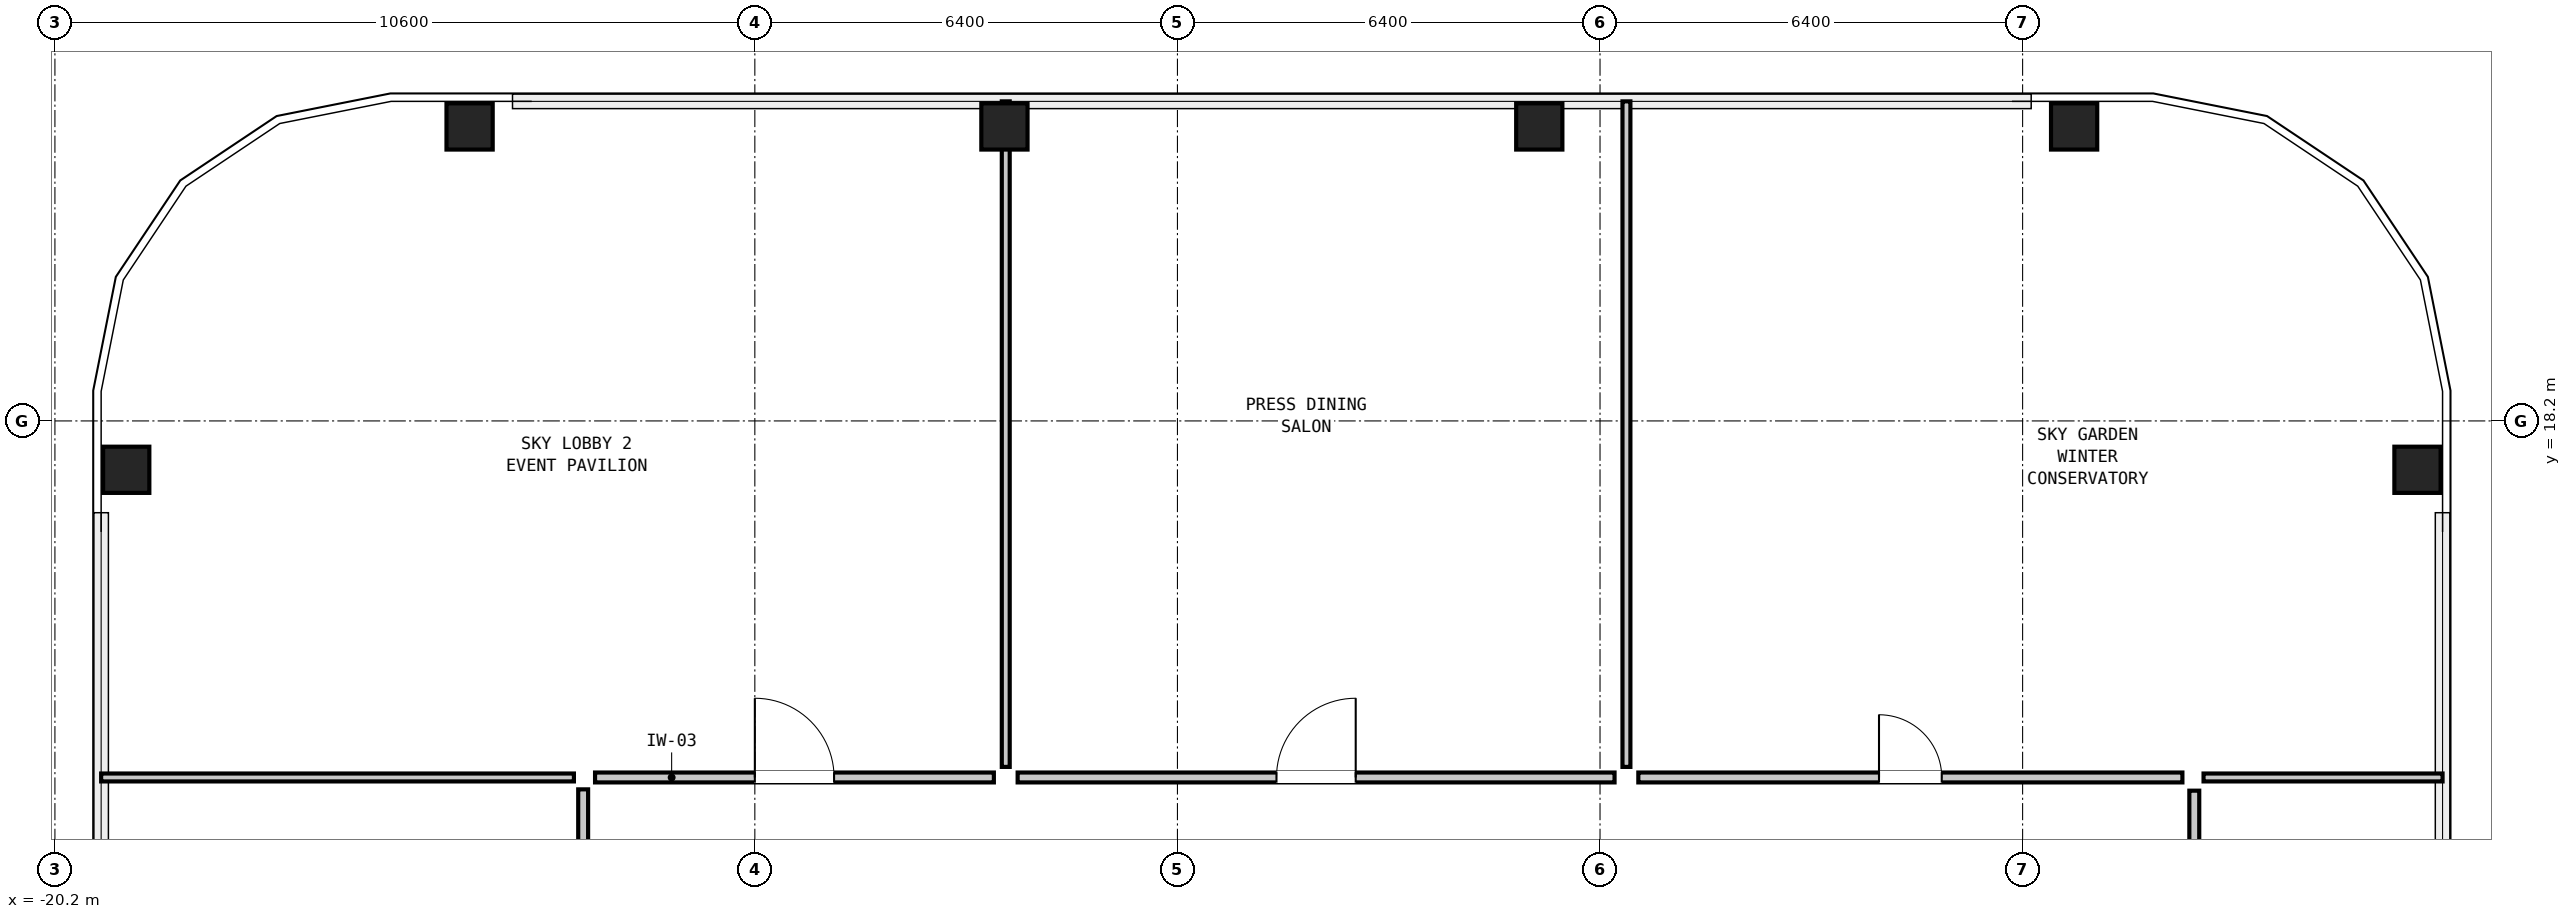
"""IFC4 building model, lengths in metres.
Left out: names, types, materials, properties, quantities, classifications, styles, units other than length and angle.
Written with IfcOpenShell. Run it as: python <this file> out.ifc"""

import sys

from ifc_helpers import new_model, si_unit, direction, frame, frame_2d, origin, origin_2d, place, context, subcontext, project, spatial, rectangle, hollow_rectangle, extrude, element, fill, save


model = new_model("IFC4")
c1 = context("Model", 3, precision=1e-05, world=origin(), true_north=direction((0.0, 1.0)))
c2 = subcontext(c1, "Body", "Model", "MODEL_VIEW")
j1 = project(units=[si_unit("LENGTHUNIT", "METRE"), si_unit("PLANEANGLEUNIT", "RADIAN")], contexts=[c1])
p1 = place(None, origin())
s1 = spatial("IfcSite", under=j1, at=p1, CompositionType="ELEMENT")
p2 = place(p1, origin())
s2 = spatial("IfcBuilding", under=s1, at=p2, CompositionType="ELEMENT")
p3 = place(p2, frame((0.0, 0.0, 148.2)))
s3 = spatial("IfcBuildingStorey", under=s2, at=p3, CompositionType="ELEMENT", Elevation=148.2)
for number, where, z_axis, x_axis in (
    (1, (15.58, 17.46, 0.0), (0.0, 0.0, 1.0), (0.0, 1.0, 0.0)),
    (2, (10.38, 22.66, 0.0), (0.0, 0.0, 1.0), (1.0, 0.0, 0.0)),
    (3, (2.28, 22.66, 0.0), (0.0, 0.0, 1.0), (1.0, 0.0, 0.0)),
    (4, (-5.82, 22.66, 0.0), (0.0, 0.0, 1.0), (1.0, 0.0, 0.0)),
    (5, (-13.92, 22.66, 0.0), (0.0, 0.0, 1.0), (1.0, 0.0, 0.0)),
    (6, (-19.12, 17.46, 0.0), (0.0, 0.0, 1.0), (0.0, 1.0, 0.0)),
):
    element("IfcColumn", number, at=place(p3, frame(where, z_axis=z_axis, x_axis=x_axis)), inside=s3, PredefinedType="COLUMN", context=c2, shape_type="SweptSolid", body=[
        extrude(hollow_rectangle(XDim=0.7, YDim=0.7, WallThickness=0.045, at=origin_2d()), origin(), (0.0, 0.0, 1.0), 3.6),
    ])
p4 = place(p3, frame((-19.5, 12.8, 0.0), z_axis=(0.0, 0.0, 1.0), x_axis=(1.0, 0.0, 0.0)))
e7 = element("IfcWall", 7, at=p4, inside=s3, PredefinedType="PARTITIONING", context=c2, shape_type="SweptSolid", body=[
    extrude(rectangle(XDim=7.16, YDim=0.12, at=frame_2d((3.58, 0.0))), origin(), (0.0, 0.0, 1.0), 3.22),
])
p5 = place(p3, frame((12.34, 12.8, 0.0), z_axis=(0.0, 0.0, 1.0), x_axis=(1.0, 0.0, 0.0)))
e8 = element("IfcWall", 8, at=p5, inside=s3, PredefinedType="PARTITIONING", context=c2, shape_type="SweptSolid", body=[
    extrude(rectangle(XDim=3.62, YDim=0.12, at=frame_2d((1.81, 0.0))), origin(), (0.0, 0.0, 1.0), 3.22),
])
for number, where, z_axis, x_axis in (
    (9, (-5.8, 12.96, 0.0), (0.0, 0.0, 1.0), (0.0, 1.0, 0.0)),
    (10, (3.6, 12.96, 0.0), (0.0, 0.0, 1.0), (0.0, 1.0, 0.0)),
):
    element("IfcWall", number, at=place(p3, frame(where, z_axis=z_axis, x_axis=x_axis)), inside=s3, PredefinedType="PARTITIONING", context=c2, shape_type="SweptSolid", body=[
        extrude(rectangle(XDim=10.08, YDim=0.12, at=frame_2d((5.04, 0.0))), origin(), (0.0, 0.0, 1.0), 2.438),
    ])
p6 = place(p3, frame((-12.02, 12.8, 0.0), z_axis=(0.0, 0.0, 1.0), x_axis=(1.0, 0.0, 0.0)))
e11 = element("IfcWall", 11, at=p6, inside=s3, PredefinedType="PARTITIONING", context=c2, shape_type="SweptSolid", body=[
    extrude(rectangle(XDim=6.04, YDim=0.15, at=frame_2d((3.02, 0.0))), origin(), (0.0, 0.0, 1.0), 3.22),
])
p7 = place(p6, frame((2.42, 0.0, 0.0)))
e12 = element("IfcOpeningElement", 12, at=p7, cuts=e11, PredefinedType="OPENING", context=c2, shape_type="SweptSolid", body=[
    extrude(rectangle(XDim=1.2, YDim=2.1, at=frame_2d((0.6, 1.05))), frame((0.0, 0.087, 0.0), z_axis=(0.0, -1.0, 0.0), x_axis=(1.0, 0.0, 0.0)), (0.0, 0.0, 1.0), 0.174),
])
p8 = place(p3, frame((-5.62, 12.8, 0.0), z_axis=(0.0, 0.0, 1.0), x_axis=(1.0, 0.0, 0.0)))
e13 = element("IfcWall", 13, at=p8, inside=s3, PredefinedType="PARTITIONING", context=c2, shape_type="SweptSolid", body=[
    extrude(rectangle(XDim=9.04, YDim=0.15, at=frame_2d((4.52, 0.0))), origin(), (0.0, 0.0, 1.0), 3.22),
])
p9 = place(p8, frame((3.92, 0.0, 0.0)))
e14 = element("IfcOpeningElement", 14, at=p9, cuts=e13, PredefinedType="OPENING", context=c2, shape_type="SweptSolid", body=[
    extrude(rectangle(XDim=1.2, YDim=2.1, at=frame_2d((0.6, 1.05))), frame((0.0, 0.087, 0.0), z_axis=(0.0, -1.0, 0.0), x_axis=(1.0, 0.0, 0.0)), (0.0, 0.0, 1.0), 0.174),
])
p10 = place(p3, frame((3.78, 12.8, 0.0), z_axis=(0.0, 0.0, 1.0), x_axis=(1.0, 0.0, 0.0)))
e15 = element("IfcWall", 15, at=p10, inside=s3, PredefinedType="PARTITIONING", context=c2, shape_type="SweptSolid", body=[
    extrude(rectangle(XDim=8.24, YDim=0.15, at=frame_2d((4.12, 0.0))), origin(), (0.0, 0.0, 1.0), 3.22),
])
p11 = place(p10, frame((3.645, 0.0, 0.0)))
e16 = element("IfcOpeningElement", 16, at=p11, cuts=e15, PredefinedType="OPENING", context=c2, shape_type="SweptSolid", body=[
    extrude(rectangle(XDim=0.95, YDim=2.1, at=frame_2d((0.475, 1.05))), frame((0.0, 0.087, 0.0), z_axis=(0.0, -1.0, 0.0), x_axis=(1.0, 0.0, 0.0)), (0.0, 0.0, 1.0), 0.174),
])
p12 = place(p3, frame((-12.2, -11.42, 0.0), z_axis=(0.0, 0.0, 1.0), x_axis=(0.0, 1.0, 0.0)))
e17 = element("IfcWall", 17, at=p12, inside=s3, PredefinedType="PARTITIONING", context=c2, shape_type="SweptSolid", body=[
    extrude(rectangle(XDim=24.04, YDim=0.15, at=frame_2d((12.02, 0.0))), origin(), (0.0, 0.0, 1.0), 3.22),
])
p13 = place(p12, frame((11.545, 0.0, 0.0)))
e18 = element("IfcOpeningElement", 18, at=p13, cuts=e17, PredefinedType="OPENING", context=c2, shape_type="SweptSolid", body=[
    extrude(rectangle(XDim=0.95, YDim=2.1, at=frame_2d((0.475, 1.05))), frame((0.0, 0.087, 0.0), z_axis=(0.0, -1.0, 0.0), x_axis=(1.0, 0.0, 0.0)), (0.0, 0.0, 1.0), 0.174),
])
p14 = place(p3, frame((12.2, 3.8, 0.0), z_axis=(0.0, 0.0, 1.0), x_axis=(0.0, 1.0, 0.0)))
e19 = element("IfcWall", 19, at=p14, inside=s3, PredefinedType="PARTITIONING", context=c2, shape_type="SweptSolid", body=[
    extrude(rectangle(XDim=8.8, YDim=0.15, at=frame_2d((4.4, 0.0))), origin(), (0.0, 0.0, 1.0), 3.22),
])
p15 = place(p14, frame((3.8, 0.0, 0.0)))
e20 = element("IfcOpeningElement", 20, at=p15, cuts=e19, PredefinedType="OPENING", context=c2, shape_type="SweptSolid", body=[
    extrude(rectangle(XDim=1.2, YDim=2.1, at=frame_2d((0.6, 1.05))), frame((0.0, 0.087, 0.0), z_axis=(0.0, -1.0, 0.0), x_axis=(1.0, 0.0, 0.0)), (0.0, 0.0, 1.0), 0.174),
])
p16 = place(p7, origin())
e21 = element("IfcDoor", 21, at=p16, inside=s3, OperationType="SINGLE_SWING_LEFT", PredefinedType="DOOR", context=c2, shape_type="SweptSolid", body=[
    extrude(rectangle(XDim=1.2, YDim=2.1, at=frame_2d((0.6, 1.05))), frame((0.0, 0.025, 0.0), z_axis=(0.0, -1.0, 0.0), x_axis=(1.0, 0.0, 0.0)), (0.0, 0.0, 1.0), 0.05),
])
fill(e12, e21)
p17 = place(p9, origin())
e22 = element("IfcDoor", 22, at=p17, inside=s3, OperationType="SINGLE_SWING_RIGHT", PredefinedType="DOOR", context=c2, shape_type="SweptSolid", body=[
    extrude(rectangle(XDim=1.2, YDim=2.1, at=frame_2d((0.6, 1.05))), frame((0.0, 0.025, 0.0), z_axis=(0.0, -1.0, 0.0), x_axis=(1.0, 0.0, 0.0)), (0.0, 0.0, 1.0), 0.05),
])
fill(e14, e22)
p18 = place(p11, origin())
e23 = element("IfcDoor", 23, at=p18, inside=s3, OperationType="SINGLE_SWING_LEFT", PredefinedType="DOOR", context=c2, shape_type="SweptSolid", body=[
    extrude(rectangle(XDim=0.95, YDim=2.1, at=frame_2d((0.475, 1.05))), frame((0.0, 0.025, 0.0), z_axis=(0.0, -1.0, 0.0), x_axis=(1.0, 0.0, 0.0)), (0.0, 0.0, 1.0), 0.05),
])
fill(e16, e23)
save(model, sys.argv[1])
